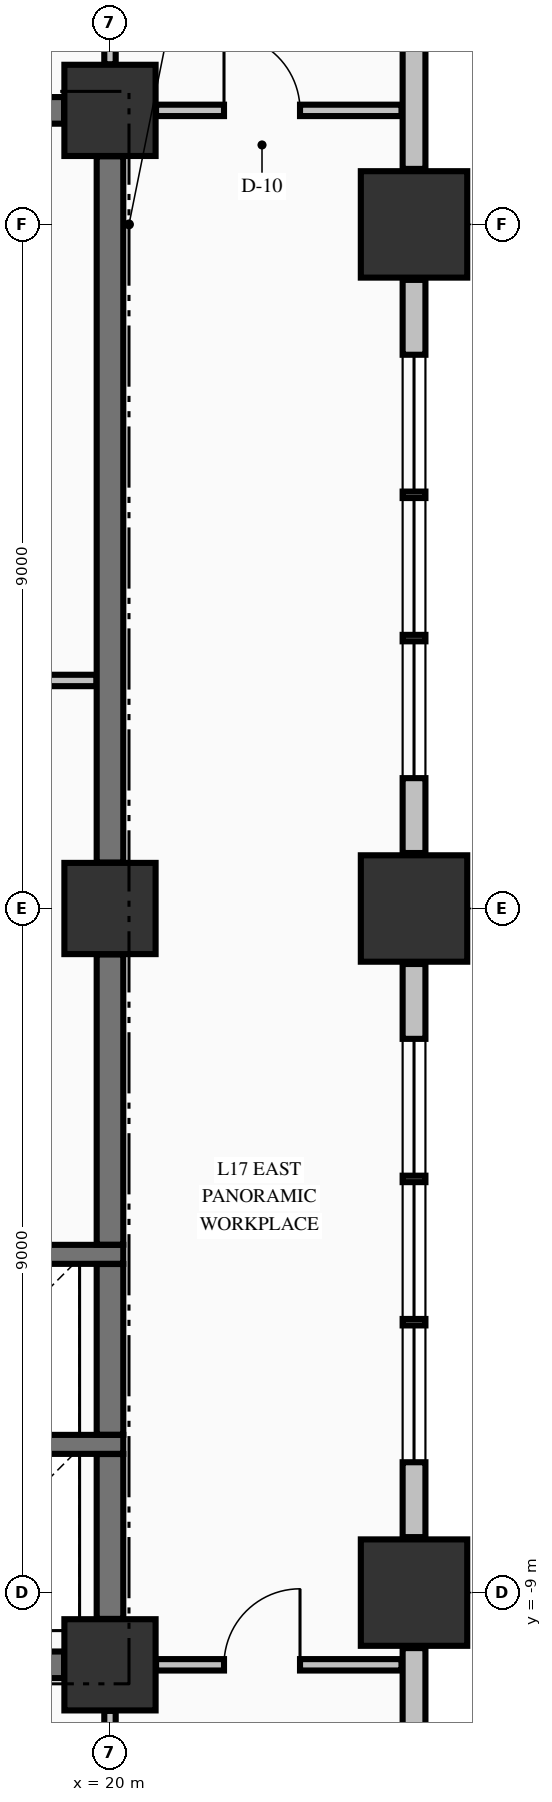
"""IFC4 building model, lengths in metres.
Left out: names, types, materials, properties, quantities, classifications, styles, units other than length and angle.
Written with IfcOpenShell. Run it as: python <this file> out.ifc"""

import sys

from ifc_helpers import new_model, si_unit, direction, frame, frame_2d, origin, origin_2d, place, context, subcontext, project, spatial, rectangle, extrude, element, fill, save


model = new_model("IFC4")
c1 = context("Model", 3, precision=1e-05, world=origin(), true_north=direction((0.0, 1.0)))
c2 = subcontext(c1, "Body", "Model", "MODEL_VIEW")
j1 = project(units=[si_unit("LENGTHUNIT", "METRE"), si_unit("PLANEANGLEUNIT", "RADIAN")], contexts=[c1])
p1 = place(None, origin())
s1 = spatial("IfcSite", under=j1, at=p1, CompositionType="ELEMENT")
p2 = place(p1, origin())
s2 = spatial("IfcBuilding", under=s1, at=p2, CompositionType="ELEMENT")
p3 = place(p2, frame((0.0, 0.0, 71.47)))
s3 = spatial("IfcBuildingStorey", under=s2, at=p3, CompositionType="ELEMENT", Elevation=71.47)
for number, where, z_axis, x_axis in (
    (1, (24.0, -9.0, -0.325), (0.0, 0.0, 1.0), (1.0, 0.0, 0.0)),
    (2, (24.0, 0.0, -0.325), (0.0, 0.0, 1.0), (1.0, 0.0, 0.0)),
    (3, (24.0, 9.0, -0.325), (0.0, 0.0, 1.0), (1.0, 0.0, 0.0)),
):
    element("IfcColumn", number, at=place(p3, frame(where, z_axis=z_axis, x_axis=x_axis)), inside=s3, PredefinedType="COLUMN", context=c2, shape_type="SweptSolid", body=[
        extrude(rectangle(XDim=1.4, YDim=1.4, at=origin_2d()), origin(), (0.0, 0.0, 1.0), 3.645),
    ])
for number, where, z_axis, x_axis in (
    (4, (20.0, -9.95, -0.325), (0.0, 0.0, 1.0), (1.0, 0.0, 0.0)),
    (5, (20.0, 10.5, -0.325), (0.0, 0.0, 1.0), (1.0, 0.0, 0.0)),
    (6, (20.0, 0.0, -0.325), (0.0, 0.0, 1.0), (1.0, 0.0, 0.0)),
):
    element("IfcColumn", number, at=place(p3, frame(where, z_axis=z_axis, x_axis=x_axis)), inside=s3, PredefinedType="COLUMN", context=c2, shape_type="SweptSolid", body=[
        extrude(rectangle(XDim=1.2, YDim=1.2, at=origin_2d()), origin(), (0.0, 0.0, 1.0), 3.645),
    ])
p4 = place(p3, frame((24.0, -22.27, 0.0), z_axis=(0.0, 0.0, 1.0), x_axis=(0.0, 1.0, 0.0)))
e7 = element("IfcWall", 7, at=p4, inside=s3, PredefinedType="STANDARD", context=c2, shape_type="SweptSolid", body=[
    extrude(rectangle(XDim=12.54, YDim=0.3, at=frame_2d((6.27, 0.0))), origin(), (0.0, 0.0, 1.0), 2.712),
])
p5 = place(p3, frame((24.0, -8.27, 0.0), z_axis=(0.0, 0.0, 1.0), x_axis=(0.0, 1.0, 0.0)))
e8 = element("IfcWall", 8, at=p5, inside=s3, PredefinedType="STANDARD", context=c2, shape_type="SweptSolid", body=[
    extrude(rectangle(XDim=7.54, YDim=0.3, at=frame_2d((3.77, 0.0))), origin(), (0.0, 0.0, 1.0), 2.712),
])
p6 = place(p5, frame((0.985, 0.0, 0.78)))
e9 = element("IfcOpeningElement", 9, at=p6, cuts=e8, PredefinedType="OPENING", context=c2, shape_type="SweptSolid", body=[
    extrude(rectangle(XDim=1.8, YDim=1.72, at=frame_2d((0.9, 0.86))), frame((0.0, 0.16, 0.0), z_axis=(0.0, -1.0, 0.0), x_axis=(1.0, 0.0, 0.0)), (0.0, 0.0, 1.0), 0.32),
])
p7 = place(p5, frame((2.87, 0.0, 0.78)))
e10 = element("IfcOpeningElement", 10, at=p7, cuts=e8, PredefinedType="OPENING", context=c2, shape_type="SweptSolid", body=[
    extrude(rectangle(XDim=1.8, YDim=1.72, at=frame_2d((0.9, 0.86))), frame((0.0, 0.16, 0.0), z_axis=(0.0, -1.0, 0.0), x_axis=(1.0, 0.0, 0.0)), (0.0, 0.0, 1.0), 0.32),
])
p8 = place(p5, frame((4.755, 0.0, 0.78)))
e11 = element("IfcOpeningElement", 11, at=p8, cuts=e8, PredefinedType="OPENING", context=c2, shape_type="SweptSolid", body=[
    extrude(rectangle(XDim=1.8, YDim=1.72, at=frame_2d((0.9, 0.86))), frame((0.0, 0.16, 0.0), z_axis=(0.0, -1.0, 0.0), x_axis=(1.0, 0.0, 0.0)), (0.0, 0.0, 1.0), 0.32),
])
p9 = place(p3, frame((24.0, 0.73, 0.0), z_axis=(0.0, 0.0, 1.0), x_axis=(0.0, 1.0, 0.0)))
e12 = element("IfcWall", 12, at=p9, inside=s3, PredefinedType="STANDARD", context=c2, shape_type="SweptSolid", body=[
    extrude(rectangle(XDim=7.54, YDim=0.3, at=frame_2d((3.77, 0.0))), origin(), (0.0, 0.0, 1.0), 2.712),
])
p10 = place(p9, frame((0.985, 0.0, 0.78)))
e13 = element("IfcOpeningElement", 13, at=p10, cuts=e12, PredefinedType="OPENING", context=c2, shape_type="SweptSolid", body=[
    extrude(rectangle(XDim=1.8, YDim=1.72, at=frame_2d((0.9, 0.86))), frame((0.0, 0.16, 0.0), z_axis=(0.0, -1.0, 0.0), x_axis=(1.0, 0.0, 0.0)), (0.0, 0.0, 1.0), 0.32),
])
p11 = place(p9, frame((2.87, 0.0, 0.78)))
e14 = element("IfcOpeningElement", 14, at=p11, cuts=e12, PredefinedType="OPENING", context=c2, shape_type="SweptSolid", body=[
    extrude(rectangle(XDim=1.8, YDim=1.72, at=frame_2d((0.9, 0.86))), frame((0.0, 0.16, 0.0), z_axis=(0.0, -1.0, 0.0), x_axis=(1.0, 0.0, 0.0)), (0.0, 0.0, 1.0), 0.32),
])
p12 = place(p9, frame((4.755, 0.0, 0.78)))
e15 = element("IfcOpeningElement", 15, at=p12, cuts=e12, PredefinedType="OPENING", context=c2, shape_type="SweptSolid", body=[
    extrude(rectangle(XDim=1.8, YDim=1.72, at=frame_2d((0.9, 0.86))), frame((0.0, 0.16, 0.0), z_axis=(0.0, -1.0, 0.0), x_axis=(1.0, 0.0, 0.0)), (0.0, 0.0, 1.0), 0.32),
])
p13 = place(p3, frame((24.0, 9.73, 0.0), z_axis=(0.0, 0.0, 1.0), x_axis=(0.0, 1.0, 0.0)))
e16 = element("IfcWall", 16, at=p13, inside=s3, PredefinedType="STANDARD", context=c2, shape_type="SweptSolid", body=[
    extrude(rectangle(XDim=12.54, YDim=0.3, at=frame_2d((6.27, 0.0))), origin(), (0.0, 0.0, 1.0), 2.712),
])
p14 = place(p3, frame((14.7, -9.95, 0.0), z_axis=(0.0, 0.0, 1.0), x_axis=(1.0, 0.0, 0.0)))
e17 = element("IfcWall", 17, at=p14, inside=s3, PredefinedType="SHEAR", context=c2, shape_type="SweptSolid", body=[
    extrude(rectangle(XDim=4.696, YDim=0.35, at=frame_2d((2.348, 0.0))), origin(), (0.0, 0.0, 1.0), 3.32),
])
p15 = place(p14, frame((0.8, 0.0, 0.0)))
e18 = element("IfcOpeningElement", 18, at=p15, cuts=e17, PredefinedType="OPENING", context=c2, shape_type="SweptSolid", body=[
    extrude(rectangle(XDim=0.9, YDim=2.15, at=frame_2d((0.45, 1.075))), frame((0.0, 0.185, 0.0), z_axis=(0.0, -1.0, 0.0), x_axis=(1.0, 0.0, 0.0)), (0.0, 0.0, 1.0), 0.37),
])
for number, where, z_axis, x_axis in (
    (19, (17.025, -7.05, 0.0), (0.0, 0.0, 1.0), (1.0, 0.0, 0.0)),
    (20, (17.025, -4.55, 0.0), (0.0, 0.0, 1.0), (1.0, 0.0, 0.0)),
):
    element("IfcWall", number, at=place(p3, frame(where, z_axis=z_axis, x_axis=x_axis)), inside=s3, PredefinedType="SOLIDWALL", context=c2, shape_type="SweptSolid", body=[
        extrude(rectangle(XDim=3.15, YDim=0.25, at=frame_2d((1.575, 0.0))), origin(), (0.0, 0.0, 1.0), 3.32),
    ])
p16 = place(p3, frame((14.7, 10.5, 0.0), z_axis=(0.0, 0.0, 1.0), x_axis=(1.0, 0.0, 0.0)))
e21 = element("IfcWall", 21, at=p16, inside=s3, PredefinedType="SHEAR", context=c2, shape_type="SweptSolid", body=[
    extrude(rectangle(XDim=4.696, YDim=0.35, at=frame_2d((2.348, 0.0))), origin(), (0.0, 0.0, 1.0), 3.32),
])
p17 = place(p16, frame((0.63, 0.0, 0.0)))
e22 = element("IfcOpeningElement", 22, at=p17, cuts=e21, PredefinedType="OPENING", context=c2, shape_type="SweptSolid", body=[
    extrude(rectangle(XDim=0.9, YDim=2.15, at=frame_2d((0.45, 1.075))), frame((0.0, 0.185, 0.0), z_axis=(0.0, -1.0, 0.0), x_axis=(1.0, 0.0, 0.0)), (0.0, 0.0, 1.0), 0.37),
])
p18 = place(p16, frame((3.27, 0.0, 0.0)))
e23 = element("IfcOpeningElement", 23, at=p18, cuts=e21, PredefinedType="OPENING", context=c2, shape_type="SweptSolid", body=[
    extrude(rectangle(XDim=0.9, YDim=2.15, at=frame_2d((0.45, 1.075))), frame((0.0, 0.185, 0.0), z_axis=(0.0, -1.0, 0.0), x_axis=(1.0, 0.0, 0.0)), (0.0, 0.0, 1.0), 0.37),
])
p19 = place(p3, frame((20.606, -9.95, 0.0), z_axis=(0.0, 0.0, 1.0), x_axis=(1.0, 0.0, 0.0)))
e24 = element("IfcWall", 24, at=p19, inside=s3, PredefinedType="PARTITIONING", context=c2, shape_type="SweptSolid", body=[
    extrude(rectangle(XDim=3.229, YDim=0.15, at=frame_2d((1.615, 0.0))), origin(), (0.0, 0.0, 1.0), 3.32),
])
p20 = place(p19, frame((0.894, 0.0, 0.0)))
e25 = element("IfcOpeningElement", 25, at=p20, cuts=e24, PredefinedType="OPENING", context=c2, shape_type="SweptSolid", body=[
    extrude(rectangle(XDim=1.0, YDim=2.15, at=frame_2d((0.5, 1.075))), frame((0.0, 0.085, 0.0), z_axis=(0.0, -1.0, 0.0), x_axis=(1.0, 0.0, 0.0)), (0.0, 0.0, 1.0), 0.17),
])
p21 = place(p3, frame((16.775, 3.0, 0.0), z_axis=(0.0, 0.0, 1.0), x_axis=(1.0, 0.0, 0.0)))
e26 = element("IfcWall", 26, at=p21, inside=s3, PredefinedType="PARTITIONING", context=c2, shape_type="SweptSolid", body=[
    extrude(rectangle(XDim=3.047, YDim=0.15, at=frame_2d((1.523, 0.0))), origin(), (0.0, 0.0, 1.0), 3.32),
])
p22 = place(p21, frame((1.17, 0.0, 0.0)))
e27 = element("IfcOpeningElement", 27, at=p22, cuts=e26, PredefinedType="OPENING", context=c2, shape_type="SweptSolid", body=[
    extrude(rectangle(XDim=0.95, YDim=2.15, at=frame_2d((0.475, 1.075))), frame((0.0, 0.085, 0.0), z_axis=(0.0, -1.0, 0.0), x_axis=(1.0, 0.0, 0.0)), (0.0, 0.0, 1.0), 0.17),
])
p23 = place(p3, frame((20.606, 10.5, 0.0), z_axis=(0.0, 0.0, 1.0), x_axis=(1.0, 0.0, 0.0)))
e28 = element("IfcWall", 28, at=p23, inside=s3, PredefinedType="PARTITIONING", context=c2, shape_type="SweptSolid", body=[
    extrude(rectangle(XDim=3.229, YDim=0.15, at=frame_2d((1.615, 0.0))), origin(), (0.0, 0.0, 1.0), 3.32),
])
p24 = place(p23, frame((0.894, 0.0, 0.0)))
e29 = element("IfcOpeningElement", 29, at=p24, cuts=e28, PredefinedType="OPENING", context=c2, shape_type="SweptSolid", body=[
    extrude(rectangle(XDim=1.0, YDim=2.15, at=frame_2d((0.5, 1.075))), frame((0.0, 0.085, 0.0), z_axis=(0.0, -1.0, 0.0), x_axis=(1.0, 0.0, 0.0)), (0.0, 0.0, 1.0), 0.17),
])
p25 = place(p3, frame((20.0, -9.346, 0.0), z_axis=(0.0, 0.0, 1.0), x_axis=(0.0, 1.0, 0.0)))
e30 = element("IfcWall", 30, at=p25, inside=s3, PredefinedType="SHEAR", context=c2, shape_type="SweptSolid", body=[
    extrude(rectangle(XDim=2.169, YDim=0.35, at=frame_2d((1.084, 0.0))), origin(), (0.0, 0.0, 1.0), 3.32),
])
p26 = place(p3, frame((20.0, -6.923, 0.0), z_axis=(0.0, 0.0, 1.0), x_axis=(0.0, 1.0, 0.0)))
e31 = element("IfcWall", 31, at=p26, inside=s3, PredefinedType="SHEAR", context=c2, shape_type="SweptSolid", body=[
    extrude(rectangle(XDim=2.246, YDim=0.35, at=frame_2d((1.123, 0.0))), origin(), (0.0, 0.0, 1.0), 3.32),
])
p27 = place(p3, frame((20.0, -4.423, 0.0), z_axis=(0.0, 0.0, 1.0), x_axis=(0.0, 1.0, 0.0)))
e32 = element("IfcWall", 32, at=p27, inside=s3, PredefinedType="SHEAR", context=c2, shape_type="SweptSolid", body=[
    extrude(rectangle(XDim=3.819, YDim=0.35, at=frame_2d((1.91, 0.0))), origin(), (0.0, 0.0, 1.0), 3.32),
])
p28 = place(p3, frame((20.0, 0.604, 0.0), z_axis=(0.0, 0.0, 1.0), x_axis=(0.0, 1.0, 0.0)))
e33 = element("IfcWall", 33, at=p28, inside=s3, PredefinedType="SHEAR", context=c2, shape_type="SweptSolid", body=[
    extrude(rectangle(XDim=9.292, YDim=0.35, at=frame_2d((4.646, 0.0))), origin(), (0.0, 0.0, 1.0), 3.32),
])
p29 = place(p3, frame((20.0, -12.472, 0.0), z_axis=(0.0, 0.0, 1.0), x_axis=(0.0, 1.0, 0.0)))
e34 = element("IfcWall", 34, at=p29, inside=s3, PredefinedType="PARTITIONING", context=c2, shape_type="SweptSolid", body=[
    extrude(rectangle(XDim=1.916, YDim=0.15, at=frame_2d((0.958, 0.0))), origin(), (0.0, 0.0, 1.0), 3.32),
])
p30 = place(p29, frame((0.747, 0.0, 0.0)))
e35 = element("IfcOpeningElement", 35, at=p30, cuts=e34, PredefinedType="OPENING", context=c2, shape_type="SweptSolid", body=[
    extrude(rectangle(XDim=0.95, YDim=2.15, at=frame_2d((0.475, 1.075))), frame((0.0, 0.085, 0.0), z_axis=(0.0, -1.0, 0.0), x_axis=(1.0, 0.0, 0.0)), (0.0, 0.0, 1.0), 0.17),
])
p31 = place(p3, frame((20.0, 11.106, 0.0), z_axis=(0.0, 0.0, 1.0), x_axis=(0.0, 1.0, 0.0)))
e36 = element("IfcWall", 36, at=p31, inside=s3, PredefinedType="PARTITIONING", context=c2, shape_type="SweptSolid", body=[
    extrude(rectangle(XDim=2.616, YDim=0.15, at=frame_2d((1.308, 0.0))), origin(), (0.0, 0.0, 1.0), 3.32),
])
p32 = place(p31, frame((0.569, 0.0, 0.0)))
e37 = element("IfcOpeningElement", 37, at=p32, cuts=e36, PredefinedType="OPENING", context=c2, shape_type="SweptSolid", body=[
    extrude(rectangle(XDim=0.95, YDim=2.15, at=frame_2d((0.475, 1.075))), frame((0.0, 0.085, 0.0), z_axis=(0.0, -1.0, 0.0), x_axis=(1.0, 0.0, 0.0)), (0.0, 0.0, 1.0), 0.17),
])
p33 = place(p6, origin())
e38 = element("IfcWindow", 38, at=p33, inside=s3, PartitioningType="SINGLE_PANEL", PredefinedType="WINDOW", context=c2, shape_type="SweptSolid", body=[
    extrude(rectangle(XDim=1.8, YDim=1.72, at=frame_2d((0.9, 0.86))), frame((0.0, 0.03, 0.0), z_axis=(0.0, -1.0, 0.0), x_axis=(1.0, 0.0, 0.0)), (0.0, 0.0, 1.0), 0.06),
])
fill(e9, e38)
p34 = place(p7, origin())
e39 = element("IfcWindow", 39, at=p34, inside=s3, PartitioningType="SINGLE_PANEL", PredefinedType="WINDOW", context=c2, shape_type="SweptSolid", body=[
    extrude(rectangle(XDim=1.8, YDim=1.72, at=frame_2d((0.9, 0.86))), frame((0.0, 0.03, 0.0), z_axis=(0.0, -1.0, 0.0), x_axis=(1.0, 0.0, 0.0)), (0.0, 0.0, 1.0), 0.06),
])
fill(e10, e39)
p35 = place(p8, origin())
e40 = element("IfcWindow", 40, at=p35, inside=s3, PartitioningType="SINGLE_PANEL", PredefinedType="WINDOW", context=c2, shape_type="SweptSolid", body=[
    extrude(rectangle(XDim=1.8, YDim=1.72, at=frame_2d((0.9, 0.86))), frame((0.0, 0.03, 0.0), z_axis=(0.0, -1.0, 0.0), x_axis=(1.0, 0.0, 0.0)), (0.0, 0.0, 1.0), 0.06),
])
fill(e11, e40)
p36 = place(p10, origin())
e41 = element("IfcWindow", 41, at=p36, inside=s3, PartitioningType="SINGLE_PANEL", PredefinedType="WINDOW", context=c2, shape_type="SweptSolid", body=[
    extrude(rectangle(XDim=1.8, YDim=1.72, at=frame_2d((0.9, 0.86))), frame((0.0, 0.03, 0.0), z_axis=(0.0, -1.0, 0.0), x_axis=(1.0, 0.0, 0.0)), (0.0, 0.0, 1.0), 0.06),
])
fill(e13, e41)
p37 = place(p11, origin())
e42 = element("IfcWindow", 42, at=p37, inside=s3, PartitioningType="SINGLE_PANEL", PredefinedType="WINDOW", context=c2, shape_type="SweptSolid", body=[
    extrude(rectangle(XDim=1.8, YDim=1.72, at=frame_2d((0.9, 0.86))), frame((0.0, 0.03, 0.0), z_axis=(0.0, -1.0, 0.0), x_axis=(1.0, 0.0, 0.0)), (0.0, 0.0, 1.0), 0.06),
])
fill(e14, e42)
p38 = place(p12, origin())
e43 = element("IfcWindow", 43, at=p38, inside=s3, PartitioningType="SINGLE_PANEL", PredefinedType="WINDOW", context=c2, shape_type="SweptSolid", body=[
    extrude(rectangle(XDim=1.8, YDim=1.72, at=frame_2d((0.9, 0.86))), frame((0.0, 0.03, 0.0), z_axis=(0.0, -1.0, 0.0), x_axis=(1.0, 0.0, 0.0)), (0.0, 0.0, 1.0), 0.06),
])
fill(e15, e43)
p39 = place(p24, origin())
e44 = element("IfcDoor", 44, at=p39, inside=s3, OperationType="SINGLE_SWING_LEFT", PredefinedType="DOOR", context=c2, shape_type="SweptSolid", body=[
    extrude(rectangle(XDim=1.0, YDim=2.15, at=frame_2d((0.5, 1.075))), frame((0.0, 0.025, 0.0), z_axis=(0.0, -1.0, 0.0), x_axis=(1.0, 0.0, 0.0)), (0.0, 0.0, 1.0), 0.05),
])
fill(e29, e44)
p40 = place(p20, origin())
e45 = element("IfcDoor", 45, at=p40, inside=s3, OperationType="SINGLE_SWING_RIGHT", PredefinedType="DOOR", context=c2, shape_type="SweptSolid", body=[
    extrude(rectangle(XDim=1.0, YDim=2.15, at=frame_2d((0.5, 1.075))), frame((0.0, 0.025, 0.0), z_axis=(0.0, -1.0, 0.0), x_axis=(1.0, 0.0, 0.0)), (0.0, 0.0, 1.0), 0.05),
])
fill(e25, e45)
save(model, sys.argv[1])
